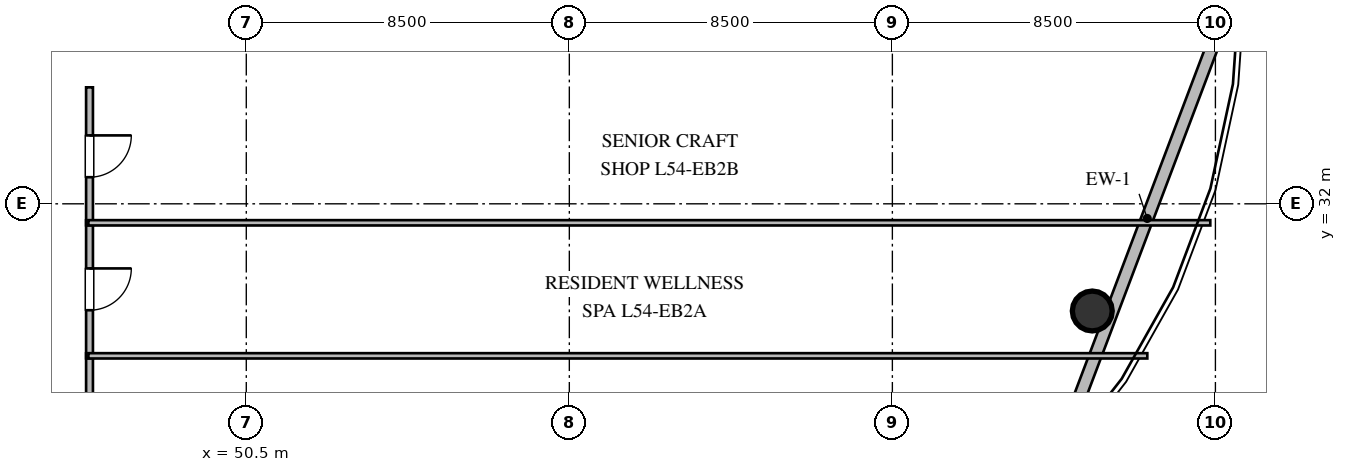
"""IFC4 building model, lengths in metres.
Left out: names, types, materials, properties, quantities, classifications, styles, units other than length and angle.
Written with IfcOpenShell. Run it as: python <this file> out.ifc"""

import sys

from ifc_helpers import new_model, si_unit, direction, frame, frame_2d, origin, origin_2d, place, context, subcontext, project, spatial, rectangle, circle, extrude, element, fill, save


model = new_model("IFC4")
c1 = context("Model", 3, precision=1e-05, world=origin(), true_north=direction((0.0, 1.0)))
c2 = subcontext(c1, "Body", "Model", "MODEL_VIEW")
j1 = project(units=[si_unit("LENGTHUNIT", "METRE"), si_unit("PLANEANGLEUNIT", "RADIAN")], contexts=[c1])
p1 = place(None, origin())
s1 = spatial("IfcSite", under=j1, at=p1, CompositionType="ELEMENT")
p2 = place(p1, origin())
s2 = spatial("IfcBuilding", under=s1, at=p2, CompositionType="ELEMENT")
p3 = place(p2, frame((0.0, 0.0, 206.4)))
s3 = spatial("IfcBuildingStorey", under=s2, at=p3, CompositionType="ELEMENT", Elevation=206.4)
p4 = place(p3, frame((72.76, 29.18, 0.0), z_axis=(0.0, 0.0, 1.0), x_axis=(1.0, 0.0, 0.0)))
e1 = element("IfcColumn", 1, at=p4, inside=s3, PredefinedType="COLUMN", context=c2, shape_type="SweptSolid", body=[
    extrude(circle(Radius=0.525, at=origin_2d()), origin(), (0.0, 0.0, 1.0), 3.6),
])
p5 = place(p3, frame((76.712, 38.243, 0.0), z_axis=(0.0, 0.0, 1.0), x_axis=(-0.353659523244, -0.935374225441, 0.0)))
e2 = element("IfcWall", 2, at=p5, inside=s3, PredefinedType="STANDARD", context=c2, shape_type="SweptSolid", body=[
    extrude(rectangle(XDim=14.172, YDim=0.32, at=frame_2d((7.086, 0.0))), origin(), (0.0, 0.0, 1.0), 3.36),
])
p6 = place(p3, frame((46.375, 28.065, 0.0), z_axis=(0.0, 0.0, 1.0), x_axis=(0.0, -1.0, 0.0)))
e3 = element("IfcWall", 3, at=p6, inside=s3, PredefinedType="PARTITIONING", context=c2, shape_type="SweptSolid", body=[
    extrude(rectangle(XDim=3.52, YDim=0.18, at=frame_2d((1.76, 0.0))), origin(), (0.0, 0.0, 1.0), 3.36),
])
p7 = place(p6, frame((1.21, 0.0, 0.0)))
e4 = element("IfcOpeningElement", 4, at=p7, cuts=e3, PredefinedType="OPENING", context=c2, shape_type="SweptSolid", body=[
    extrude(rectangle(XDim=1.1, YDim=2.1, at=frame_2d((0.55, 1.05))), frame((0.0, 0.1, 0.0), z_axis=(0.0, -1.0, 0.0), x_axis=(1.0, 0.0, 0.0)), (0.0, 0.0, 1.0), 0.2),
])
p8 = place(p3, frame((46.375, 31.565, 0.0), z_axis=(0.0, 0.0, 1.0), x_axis=(0.0, -1.0, 0.0)))
e5 = element("IfcWall", 5, at=p8, inside=s3, PredefinedType="PARTITIONING", context=c2, shape_type="SweptSolid", body=[
    extrude(rectangle(XDim=3.63, YDim=0.18, at=frame_2d((1.815, 0.0))), origin(), (0.0, 0.0, 1.0), 3.36),
])
p9 = place(p8, frame((1.265, 0.0, 0.0)))
e6 = element("IfcOpeningElement", 6, at=p9, cuts=e5, PredefinedType="OPENING", context=c2, shape_type="SweptSolid", body=[
    extrude(rectangle(XDim=1.1, YDim=2.1, at=frame_2d((0.55, 1.05))), frame((0.0, 0.1, 0.0), z_axis=(0.0, -1.0, 0.0), x_axis=(1.0, 0.0, 0.0)), (0.0, 0.0, 1.0), 0.2),
])
p10 = place(p3, frame((46.375, 35.065, 0.0), z_axis=(0.0, 0.0, 1.0), x_axis=(0.0, -1.0, 0.0)))
e7 = element("IfcWall", 7, at=p10, inside=s3, PredefinedType="PARTITIONING", context=c2, shape_type="SweptSolid", body=[
    extrude(rectangle(XDim=3.63, YDim=0.18, at=frame_2d((1.815, 0.0))), origin(), (0.0, 0.0, 1.0), 3.36),
])
p11 = place(p10, frame((1.265, 0.0, 0.0)))
e8 = element("IfcOpeningElement", 8, at=p11, cuts=e7, PredefinedType="OPENING", context=c2, shape_type="SweptSolid", body=[
    extrude(rectangle(XDim=1.1, YDim=2.1, at=frame_2d((0.55, 1.05))), frame((0.0, 0.1, 0.0), z_axis=(0.0, -1.0, 0.0), x_axis=(1.0, 0.0, 0.0)), (0.0, 0.0, 1.0), 0.2),
])
p12 = place(p3, frame((46.345, 28.0, 0.0), z_axis=(0.0, 0.0, 1.0), x_axis=(1.0, 0.0, 0.0)))
e9 = element("IfcWall", 9, at=p12, inside=s3, PredefinedType="PARTITIONING", context=c2, shape_type="SweptSolid", body=[
    extrude(rectangle(XDim=27.863, YDim=0.14, at=frame_2d((13.932, 0.0))), origin(), (0.0, 0.0, 1.0), 2.806),
])
p13 = place(p3, frame((46.345, 31.5, 0.0), z_axis=(0.0, 0.0, 1.0), x_axis=(1.0, 0.0, 0.0)))
e10 = element("IfcWall", 10, at=p13, inside=s3, PredefinedType="PARTITIONING", context=c2, shape_type="SweptSolid", body=[
    extrude(rectangle(XDim=29.52, YDim=0.14, at=frame_2d((14.76, 0.0))), origin(), (0.0, 0.0, 1.0), 3.36),
])
p14 = place(p9, origin())
e11 = element("IfcDoor", 11, at=p14, inside=s3, OperationType="SINGLE_SWING_LEFT", PredefinedType="DOOR", context=c2, shape_type="SweptSolid", body=[
    extrude(rectangle(XDim=1.1, YDim=2.1, at=frame_2d((0.55, 1.05))), frame((0.0, 0.025, 0.0), z_axis=(0.0, -1.0, 0.0), x_axis=(1.0, 0.0, 0.0)), (0.0, 0.0, 1.0), 0.05),
])
fill(e6, e11)
p15 = place(p11, origin())
e12 = element("IfcDoor", 12, at=p15, inside=s3, OperationType="SINGLE_SWING_LEFT", PredefinedType="DOOR", context=c2, shape_type="SweptSolid", body=[
    extrude(rectangle(XDim=1.1, YDim=2.1, at=frame_2d((0.55, 1.05))), frame((0.0, 0.025, 0.0), z_axis=(0.0, -1.0, 0.0), x_axis=(1.0, 0.0, 0.0)), (0.0, 0.0, 1.0), 0.05),
])
fill(e8, e12)
save(model, sys.argv[1])
